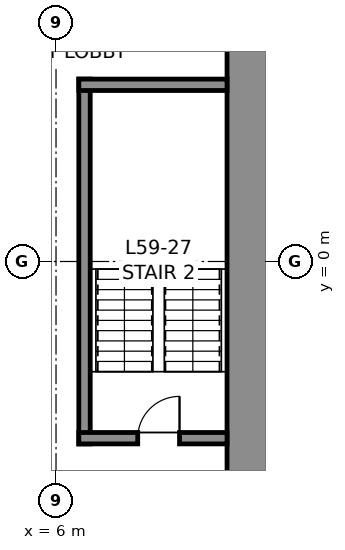
"""IFC4 building model, lengths in metres.
Left out: names, types, materials, properties, quantities, classifications, styles, units other than length and angle.
Written with IfcOpenShell. Run it as: python <this file> out.ifc"""

import sys

from ifc_helpers import new_model, si_unit, direction, frame, frame_2d, origin, place, context, subcontext, project, spatial, rectangle, extrude, element, fill, save


model = new_model("IFC4")
c1 = context("Model", 3, precision=1e-05, world=origin(), true_north=direction((0.0, 1.0)))
c2 = subcontext(c1, "Body", "Model", "MODEL_VIEW")
j1 = project(units=[si_unit("LENGTHUNIT", "METRE"), si_unit("PLANEANGLEUNIT", "RADIAN")], contexts=[c1])
p1 = place(None, origin())
s1 = spatial("IfcSite", under=j1, at=p1, CompositionType="ELEMENT")
p2 = place(p1, origin())
s2 = spatial("IfcBuilding", under=s1, at=p2, CompositionType="ELEMENT")
p3 = place(p2, frame((0.0, 0.0, 265.8)))
s3 = spatial("IfcBuildingStorey", under=s2, at=p3, CompositionType="ELEMENT", Elevation=265.8)
p4 = place(p3, frame((11.25, 10.5, 0.0), z_axis=(0.0, 0.0, 1.0), x_axis=(0.0, -1.0, 0.0)))
e1 = element("IfcWall", 1, at=p4, inside=s3, PredefinedType="SHEAR", context=c2, shape_type="SweptSolid", body=[
    extrude(rectangle(XDim=21.0, YDim=1.5, at=frame_2d((10.5, 0.0))), origin(), (0.0, 0.0, 1.0), 4.0),
])
p5 = place(p4, frame((3.7, 0.0, 0.0)))
e2 = element("IfcOpeningElement", 2, at=p5, cuts=e1, PredefinedType="OPENING", context=c2, shape_type="SweptSolid", body=[
    extrude(rectangle(XDim=1.2, YDim=2.3, at=frame_2d((0.6, 1.15))), frame((0.0, 0.76, 0.0), z_axis=(0.0, -1.0, 0.0), x_axis=(1.0, 0.0, 0.0)), (0.0, 0.0, 1.0), 1.52),
])
p6 = place(p4, frame((16.1, 0.0, 0.0)))
e3 = element("IfcOpeningElement", 3, at=p6, cuts=e1, PredefinedType="OPENING", context=c2, shape_type="SweptSolid", body=[
    extrude(rectangle(XDim=1.2, YDim=2.3, at=frame_2d((0.6, 1.15))), frame((0.0, 0.76, 0.0), z_axis=(0.0, -1.0, 0.0), x_axis=(1.0, 0.0, 0.0)), (0.0, 0.0, 1.0), 1.52),
])
p7 = place(p3, frame((6.75, -4.8, 0.0), z_axis=(0.0, 0.0, 1.0), x_axis=(0.0, 1.0, 0.0)))
e4 = element("IfcWall", 4, at=p7, inside=s3, PredefinedType="SOLIDWALL", context=c2, shape_type="SweptSolid", body=[
    extrude(rectangle(XDim=9.6, YDim=0.3, at=frame_2d((4.8, 0.0))), origin(), (0.0, 0.0, 1.0), 3.75),
])
p8 = place(p3, frame((6.6, 4.65, 0.0), z_axis=(0.0, 0.0, 1.0), x_axis=(1.0, 0.0, 0.0)))
e5 = element("IfcWall", 5, at=p8, inside=s3, PredefinedType="SOLIDWALL", context=c2, shape_type="SweptSolid", body=[
    extrude(rectangle(XDim=3.9, YDim=0.3, at=frame_2d((1.95, 0.0))), origin(), (0.0, 0.0, 1.0), 3.75),
])
p9 = place(p3, frame((10.5, -4.65, 0.0), z_axis=(0.0, 0.0, 1.0), x_axis=(-1.0, 0.0, 0.0)))
e6 = element("IfcWall", 6, at=p9, inside=s3, PredefinedType="SOLIDWALL", context=c2, shape_type="SweptSolid", body=[
    extrude(rectangle(XDim=3.9, YDim=0.3, at=frame_2d((1.95, 0.0))), origin(), (0.0, 0.0, 1.0), 3.75),
])
p10 = place(p9, frame((1.25, 0.0, 0.0)))
e7 = element("IfcOpeningElement", 7, at=p10, cuts=e6, PredefinedType="OPENING", context=c2, shape_type="SweptSolid", body=[
    extrude(rectangle(XDim=1.1, YDim=2.3, at=frame_2d((0.55, 1.15))), frame((0.0, 0.16, 0.0), z_axis=(0.0, -1.0, 0.0), x_axis=(1.0, 0.0, 0.0)), (0.0, 0.0, 1.0), 0.32),
])
p11 = place(p10, frame((1.1, 0.0, 0.0), z_axis=(0.0, 0.0, 1.0), x_axis=(-1.0, 0.0, 0.0)))
e8 = element("IfcDoor", 8, at=p11, inside=s3, OperationType="SINGLE_SWING_RIGHT", PredefinedType="DOOR", context=c2, shape_type="SweptSolid", body=[
    extrude(rectangle(XDim=1.1, YDim=2.3, at=frame_2d((0.55, 1.15))), frame((0.0, 0.025, 0.0), z_axis=(0.0, -1.0, 0.0), x_axis=(1.0, 0.0, 0.0)), (0.0, 0.0, 1.0), 0.05),
])
fill(e7, e8)
save(model, sys.argv[1])
